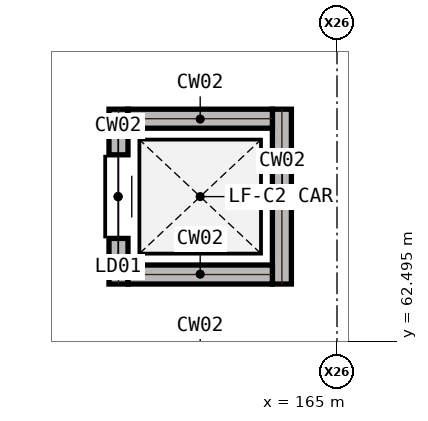
"""IFC4 building model, lengths in metres.
Left out: names, types, materials, properties, quantities, classifications, styles, units other than length and angle.
Written with IfcOpenShell. Run it as: python <this file> out.ifc"""

import sys

from ifc_helpers import new_model, si_unit, direction, frame, frame_2d, origin, place, context, subcontext, project, spatial, rectangle, extrude, element, fill, save


model = new_model("IFC4")
c1 = context("Model", 3, precision=1e-05, world=origin(), true_north=direction((0.0, 1.0)))
c2 = subcontext(c1, "Body", "Model", "MODEL_VIEW")
j1 = project(units=[si_unit("LENGTHUNIT", "METRE"), si_unit("PLANEANGLEUNIT", "RADIAN")], contexts=[c1])
p1 = place(None, origin())
s1 = spatial("IfcSite", under=j1, at=p1, CompositionType="ELEMENT")
p2 = place(p1, origin())
s2 = spatial("IfcBuilding", under=s1, at=p2, CompositionType="ELEMENT")
p3 = place(p2, frame((0.0, 0.0, -4.5)))
s3 = spatial("IfcBuildingStorey", under=s2, at=p3, CompositionType="ELEMENT", Elevation=-4.5)
p4 = place(p3, frame((162.125, 63.25, 0.0), z_axis=(0.0, 0.0, 1.0), x_axis=(0.0, 1.0, 0.0)))
e1 = element("IfcWall", 1, at=p4, inside=s3, PredefinedType="SHEAR", context=c2, shape_type="SweptSolid", body=[
    extrude(rectangle(XDim=2.3, YDim=0.25, at=frame_2d((1.15, 0.0))), origin(), (0.0, 0.0, 1.0), 4.14),
])
p5 = place(p4, frame((0.6, 0.0, 0.0)))
e2 = element("IfcOpeningElement", 2, at=p5, cuts=e1, PredefinedType="OPENING", context=c2, shape_type="SweptSolid", body=[
    extrude(rectangle(XDim=1.1, YDim=2.15, at=frame_2d((0.55, 1.075))), frame((0.0, 0.135, 0.0), z_axis=(0.0, -1.0, 0.0), x_axis=(1.0, 0.0, 0.0)), (0.0, 0.0, 1.0), 0.27),
])
p6 = place(p3, frame((164.275, 63.25, 0.0), z_axis=(0.0, 0.0, 1.0), x_axis=(0.0, 1.0, 0.0)))
e3 = element("IfcWall", 3, at=p6, inside=s3, PredefinedType="SHEAR", context=c2, shape_type="SweptSolid", body=[
    extrude(rectangle(XDim=2.3, YDim=0.25, at=frame_2d((1.15, 0.0))), origin(), (0.0, 0.0, 1.0), 4.14),
])
for number, where, z_axis, x_axis in (
    (4, (162.25, 63.375, 0.0), (0.0, 0.0, 1.0), (1.0, 0.0, 0.0)),
    (5, (162.25, 65.425, 0.0), (0.0, 0.0, 1.0), (1.0, 0.0, 0.0)),
):
    element("IfcWall", number, at=place(p3, frame(where, z_axis=z_axis, x_axis=x_axis)), inside=s3, PredefinedType="SHEAR", context=c2, shape_type="SweptSolid", body=[
        extrude(rectangle(XDim=1.9, YDim=0.25, at=frame_2d((0.95, 0.0))), origin(), (0.0, 0.0, 1.0), 4.14),
    ])
p7 = place(p5, origin())
e6 = element("IfcDoor", 6, at=p7, inside=s3, OperationType="SLIDING_TO_LEFT", PredefinedType="DOOR", context=c2, shape_type="SweptSolid", body=[
    extrude(rectangle(XDim=1.1, YDim=2.15, at=frame_2d((0.55, 1.075))), frame((0.0, 0.025, 0.0), z_axis=(0.0, -1.0, 0.0), x_axis=(1.0, 0.0, 0.0)), (0.0, 0.0, 1.0), 0.05),
])
fill(e2, e6)
save(model, sys.argv[1])
